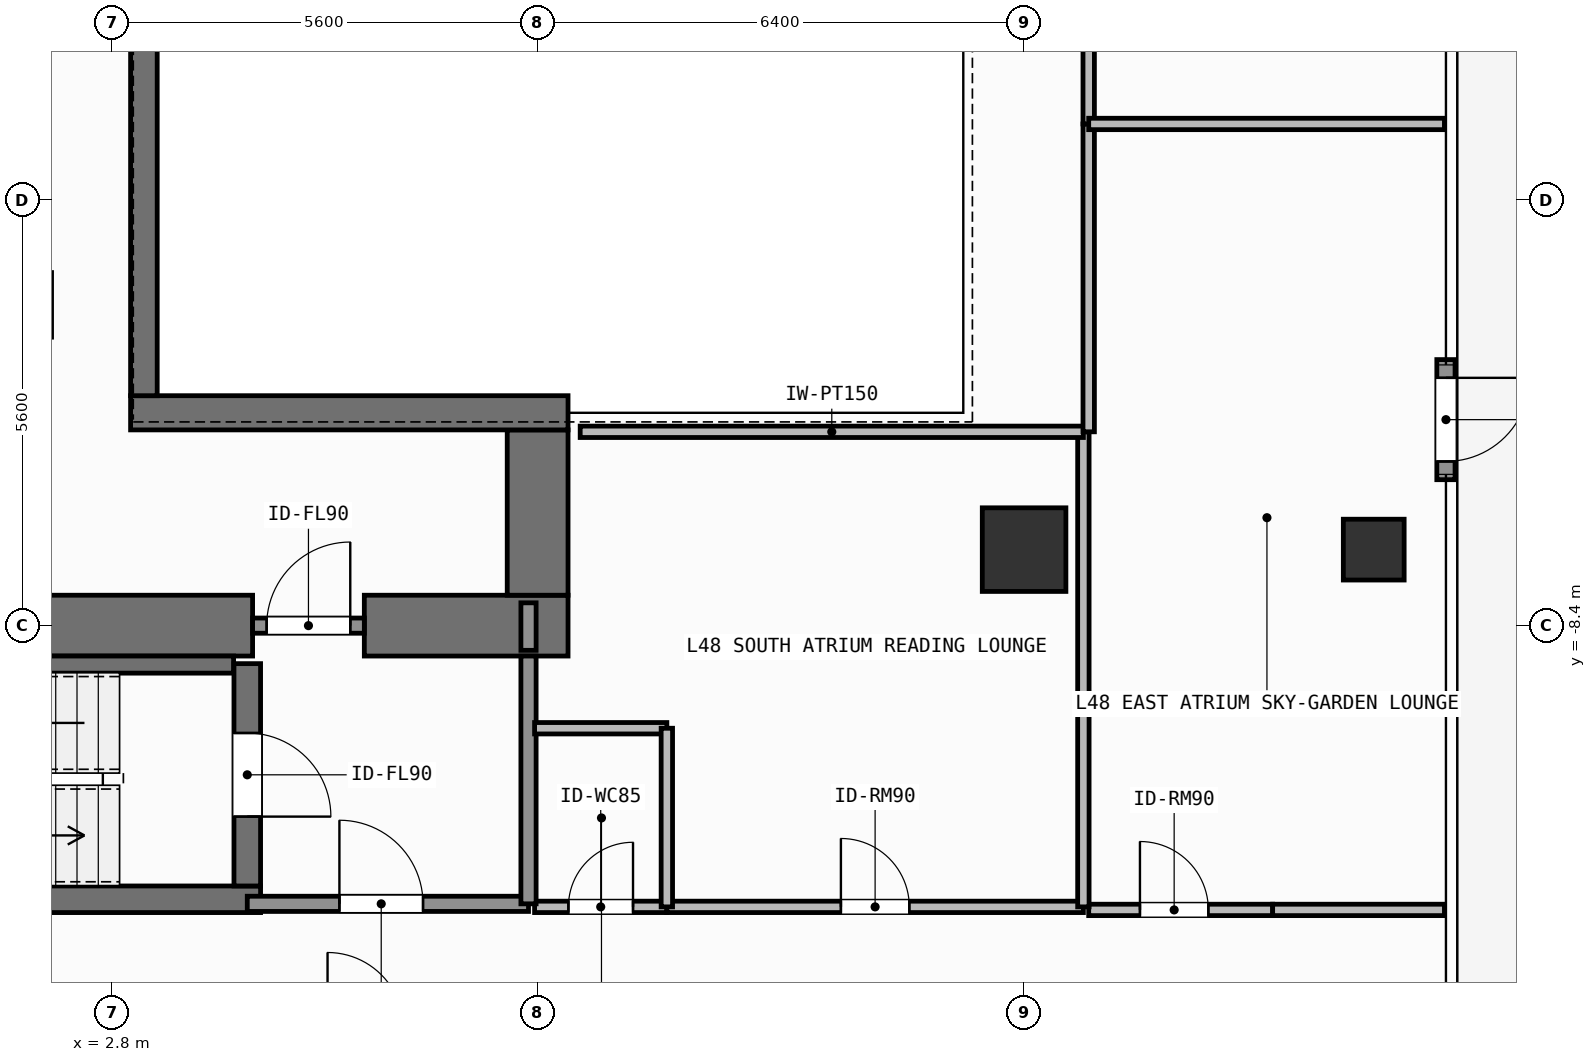
"""IFC4 building model, lengths in metres.
Left out: names, types, materials, properties, quantities, classifications, styles, units other than length and angle.
Written with IfcOpenShell. Run it as: python <this file> out.ifc"""

import sys

from ifc_helpers import new_model, si_unit, direction, frame, frame_2d, origin, origin_2d, place, context, subcontext, project, spatial, rectangle, hollow_rectangle, extrude, element, fill, save


model = new_model("IFC4")
c1 = context("Model", 3, precision=1e-05, world=origin(), true_north=direction((0.0, 1.0)))
c2 = subcontext(c1, "Body", "Model", "MODEL_VIEW")
j1 = project(units=[si_unit("LENGTHUNIT", "METRE"), si_unit("PLANEANGLEUNIT", "RADIAN")], contexts=[c1])
p1 = place(None, origin())
s1 = spatial("IfcSite", under=j1, at=p1, CompositionType="ELEMENT")
p2 = place(p1, origin())
s2 = spatial("IfcBuilding", under=s1, at=p2, CompositionType="ELEMENT")
p3 = place(p2, frame((0.0, 0.0, 195.3)))
s3 = spatial("IfcBuildingStorey", under=s2, at=p3, CompositionType="ELEMENT", Elevation=195.3)
p4 = place(p3, frame((-2.62, -8.4, 0.0), z_axis=(0.0, 0.0, 1.0), x_axis=(1.0, 0.0, 0.0)))
e1 = element("IfcWall", 1, at=p4, inside=s3, PredefinedType="SHEAR", context=c2, shape_type="SweptSolid", body=[
    extrude(rectangle(XDim=7.27, YDim=0.8, at=frame_2d((3.635, 0.0))), origin(), (0.0, 0.0, 1.0), 3.9),
])
p5 = place(p3, frame((6.12, -8.4, 0.0), z_axis=(0.0, 0.0, 1.0), x_axis=(1.0, 0.0, 0.0)))
e2 = element("IfcWall", 2, at=p5, inside=s3, PredefinedType="SHEAR", context=c2, shape_type="SweptSolid", body=[
    extrude(rectangle(XDim=2.68, YDim=0.8, at=frame_2d((1.34, 0.0))), origin(), (0.0, 0.0, 1.0), 3.9),
])
p6 = place(p3, frame((8.4, -8.0, 0.0), z_axis=(0.0, 0.0, 1.0), x_axis=(0.0, 1.0, 0.0)))
e3 = element("IfcWall", 3, at=p6, inside=s3, PredefinedType="SHEAR", context=c2, shape_type="SweptSolid", body=[
    extrude(rectangle(XDim=2.175, YDim=0.8, at=frame_2d((1.087, 0.0))), origin(), (0.0, 0.0, 1.0), 3.9),
])
p7 = place(p3, frame((3.045, -5.6, 0.0), z_axis=(0.0, 0.0, 1.0), x_axis=(1.0, 0.0, 0.0)))
e4 = element("IfcWall", 4, at=p7, inside=s3, PredefinedType="SHEAR", context=c2, shape_type="SweptSolid", body=[
    extrude(rectangle(XDim=5.755, YDim=0.45, at=frame_2d((2.877, 0.0))), origin(), (0.0, 0.0, 1.0), 3.9),
])
p8 = place(p3, frame((3.22, -5.375, 0.0), z_axis=(0.0, 0.0, 1.0), x_axis=(0.0, 1.0, 0.0)))
e5 = element("IfcWall", 5, at=p8, inside=s3, PredefinedType="SHEAR", context=c2, shape_type="SweptSolid", body=[
    extrude(rectangle(XDim=10.75, YDim=0.35, at=frame_2d((5.375, 0.0))), origin(), (0.0, 0.0, 1.0), 3.9),
])
p9 = place(p3, frame((-2.555, -12.0, 0.0), z_axis=(0.0, 0.0, 1.0), x_axis=(1.0, 0.0, 0.0)))
e6 = element("IfcWall", 6, at=p9, inside=s3, PredefinedType="SHEAR", context=c2, shape_type="SweptSolid", body=[
    extrude(rectangle(XDim=7.31, YDim=0.35, at=frame_2d((3.655, 0.0))), origin(), (0.0, 0.0, 1.0), 3.9),
])
p10 = place(p3, frame((-2.2, -8.913, 0.0), z_axis=(0.0, 0.0, 1.0), x_axis=(1.0, 0.0, 0.0)))
e7 = element("IfcWall", 7, at=p10, inside=s3, PredefinedType="SHEAR", context=c2, shape_type="SweptSolid", body=[
    extrude(rectangle(XDim=6.6, YDim=0.225, at=frame_2d((3.3, 0.0))), origin(), (0.0, 0.0, 1.0), 3.9),
])
p11 = place(p3, frame((4.58, -8.9, 0.0), z_axis=(0.0, 0.0, 1.0), x_axis=(0.0, -1.0, 0.0)))
e8 = element("IfcWall", 8, at=p11, inside=s3, PredefinedType="SHEAR", context=c2, shape_type="SweptSolid", body=[
    extrude(rectangle(XDim=2.925, YDim=0.35, at=frame_2d((1.462, 0.0))), origin(), (0.0, 0.0, 1.0), 3.9),
])
p12 = place(p11, frame((0.913, 0.0, 0.0)))
e9 = element("IfcOpeningElement", 9, at=p12, cuts=e8, PredefinedType="OPENING", context=c2, shape_type="SweptSolid", body=[
    extrude(rectangle(XDim=1.1, YDim=2.15, at=frame_2d((0.55, 1.075))), frame((0.0, 0.185, 0.0), z_axis=(0.0, -1.0, 0.0), x_axis=(1.0, 0.0, 0.0)), (0.0, 0.0, 1.0), 0.37),
])
p13 = place(p3, frame((14.8, -7.4, 0.0), z_axis=(0.0, 0.0, 1.0), x_axis=(1.0, 0.0, 0.0)))
e10 = element("IfcColumn", 10, at=p13, inside=s3, PredefinedType="COLUMN", context=c2, shape_type="SweptSolid", body=[
    extrude(rectangle(XDim=1.1, YDim=1.1, at=origin_2d()), origin(), (0.0, 0.0, 1.0), 3.9),
])
p14 = place(p3, frame((19.4, -7.4, 0.0), z_axis=(0.0, 0.0, 1.0), x_axis=(1.0, 0.0, 0.0)))
e11 = element("IfcColumn", 11, at=p14, inside=s3, PredefinedType="COLUMN", context=c2, shape_type="SweptSolid", body=[
    extrude(hollow_rectangle(XDim=0.8, YDim=0.8, WallThickness=0.036, at=origin_2d()), origin(), (0.0, 0.0, 1.0), 3.9),
])
p15 = place(p3, frame((20.35, -4.9, 0.0), z_axis=(0.0, 0.0, 1.0), x_axis=(0.0, -1.0, 0.0)))
e12 = element("IfcWall", 12, at=p15, inside=s3, PredefinedType="SOLIDWALL", context=c2, shape_type="SweptSolid", body=[
    extrude(rectangle(XDim=1.58, YDim=0.24, at=frame_2d((0.79, 0.0))), origin(), (0.0, 0.0, 1.0), 3.68),
])
p16 = place(p15, frame((0.24, 0.0, 0.0)))
e13 = element("IfcOpeningElement", 13, at=p16, cuts=e12, PredefinedType="OPENING", context=c2, shape_type="SweptSolid", body=[
    extrude(rectangle(XDim=1.1, YDim=2.2, at=frame_2d((0.55, 1.1))), frame((0.0, 0.13, 0.0), z_axis=(0.0, -1.0, 0.0), x_axis=(1.0, 0.0, 0.0)), (0.0, 0.0, 1.0), 0.26),
])
p17 = place(p3, frame((4.58, -12.06, 0.0), z_axis=(0.0, 0.0, 1.0), x_axis=(1.0, 0.0, 0.0)))
e14 = element("IfcWall", 14, at=p17, inside=s3, PredefinedType="SOLIDWALL", context=c2, shape_type="SweptSolid", body=[
    extrude(rectangle(XDim=3.7, YDim=0.2, at=frame_2d((1.85, 0.0))), origin(), (0.0, 0.0, 1.0), 3.68),
])
p18 = place(p17, frame((1.212, 0.0, 0.0)))
e15 = element("IfcOpeningElement", 15, at=p18, cuts=e14, PredefinedType="OPENING", context=c2, shape_type="SweptSolid", body=[
    extrude(rectangle(XDim=1.1, YDim=2.15, at=frame_2d((0.55, 1.075))), frame((0.0, 0.11, 0.0), z_axis=(0.0, -1.0, 0.0), x_axis=(1.0, 0.0, 0.0)), (0.0, 0.0, 1.0), 0.22),
])
p19 = place(p3, frame((4.65, -8.4, 0.0), z_axis=(0.0, 0.0, 1.0), x_axis=(1.0, 0.0, 0.0)))
e16 = element("IfcWall", 16, at=p19, inside=s3, PredefinedType="SOLIDWALL", context=c2, shape_type="SweptSolid", body=[
    extrude(rectangle(XDim=1.47, YDim=0.2, at=frame_2d((0.735, 0.0))), origin(), (0.0, 0.0, 1.0), 2.82),
])
p20 = place(p19, frame((0.185, 0.0, 0.0)))
e17 = element("IfcOpeningElement", 17, at=p20, cuts=e16, PredefinedType="OPENING", context=c2, shape_type="SweptSolid", body=[
    extrude(rectangle(XDim=1.1, YDim=2.15, at=frame_2d((0.55, 1.075))), frame((0.0, 0.11, 0.0), z_axis=(0.0, -1.0, 0.0), x_axis=(1.0, 0.0, 0.0)), (0.0, 0.0, 1.0), 0.22),
])
p21 = place(p3, frame((8.36, -12.1, 0.0), z_axis=(0.0, 0.0, 1.0), x_axis=(1.0, 0.0, 0.0)))
e18 = element("IfcWall", 18, at=p21, inside=s3, PredefinedType="PARTITIONING", context=c2, shape_type="SweptSolid", body=[
    extrude(rectangle(XDim=1.74, YDim=0.15, at=frame_2d((0.87, 0.0))), origin(), (0.0, 0.0, 1.0), 3.68),
])
p22 = place(p21, frame((0.445, 0.0, 0.0)))
e19 = element("IfcOpeningElement", 19, at=p22, cuts=e18, PredefinedType="OPENING", context=c2, shape_type="SweptSolid", body=[
    extrude(rectangle(XDim=0.85, YDim=2.1, at=frame_2d((0.425, 1.05))), frame((0.0, 0.085, 0.0), z_axis=(0.0, -1.0, 0.0), x_axis=(1.0, 0.0, 0.0)), (0.0, 0.0, 1.0), 0.17),
])
p23 = place(p3, frame((10.1, -12.1, 0.0), z_axis=(0.0, 0.0, 1.0), x_axis=(1.0, 0.0, 0.0)))
e20 = element("IfcWall", 20, at=p23, inside=s3, PredefinedType="PARTITIONING", context=c2, shape_type="SweptSolid", body=[
    extrude(rectangle(XDim=5.48, YDim=0.15, at=frame_2d((2.74, 0.0))), origin(), (0.0, 0.0, 1.0), 3.68),
])
p24 = place(p23, frame((2.29, 0.0, 0.0)))
e21 = element("IfcOpeningElement", 21, at=p24, cuts=e20, PredefinedType="OPENING", context=c2, shape_type="SweptSolid", body=[
    extrude(rectangle(XDim=0.9, YDim=2.1, at=frame_2d((0.45, 1.05))), frame((0.0, 0.085, 0.0), z_axis=(0.0, -1.0, 0.0), x_axis=(1.0, 0.0, 0.0)), (0.0, 0.0, 1.0), 0.17),
])
p25 = place(p3, frame((15.65, -12.14, 0.0), z_axis=(0.0, 0.0, 1.0), x_axis=(1.0, 0.0, 0.0)))
e22 = element("IfcWall", 22, at=p25, inside=s3, PredefinedType="PARTITIONING", context=c2, shape_type="SweptSolid", body=[
    extrude(rectangle(XDim=2.42, YDim=0.15, at=frame_2d((1.21, 0.0))), origin(), (0.0, 0.0, 1.0), 3.68),
])
p26 = place(p25, frame((0.674, 0.0, 0.0)))
e23 = element("IfcOpeningElement", 23, at=p26, cuts=e22, PredefinedType="OPENING", context=c2, shape_type="SweptSolid", body=[
    extrude(rectangle(XDim=0.9, YDim=2.1, at=frame_2d((0.45, 1.05))), frame((0.0, 0.085, 0.0), z_axis=(0.0, -1.0, 0.0), x_axis=(1.0, 0.0, 0.0)), (0.0, 0.0, 1.0), 0.17),
])
p27 = place(p3, frame((8.28, -12.06, 0.0), z_axis=(0.0, 0.0, 1.0), x_axis=(0.0, 1.0, 0.0)))
e24 = element("IfcWall", 24, at=p27, inside=s3, PredefinedType="SOLIDWALL", context=c2, shape_type="SweptSolid", body=[
    extrude(rectangle(XDim=3.26, YDim=0.2, at=frame_2d((1.63, 0.0))), origin(), (0.0, 0.0, 1.0), 3.68),
])
p28 = place(p3, frame((8.28, -8.725, 0.0), z_axis=(0.0, 0.0, 1.0), x_axis=(0.0, 1.0, 0.0)))
e25 = element("IfcWall", 25, at=p28, inside=s3, PredefinedType="SOLIDWALL", context=c2, shape_type="SweptSolid", body=[
    extrude(rectangle(XDim=0.625, YDim=0.2, at=frame_2d((0.312, 0.0))), origin(), (0.0, 0.0, 1.0), 3.68),
])
p29 = place(p3, frame((8.36, -9.75, 0.0), z_axis=(0.0, 0.0, 1.0), x_axis=(1.0, 0.0, 0.0)))
e26 = element("IfcWall", 26, at=p29, inside=s3, PredefinedType="PARTITIONING", context=c2, shape_type="SweptSolid", body=[
    extrude(rectangle(XDim=1.74, YDim=0.15, at=frame_2d((0.87, 0.0))), origin(), (0.0, 0.0, 1.0), 3.68),
])
p30 = place(p3, frame((10.1, -12.1, 0.0), z_axis=(0.0, 0.0, 1.0), x_axis=(0.0, 1.0, 0.0)))
e27 = element("IfcWall", 27, at=p30, inside=s3, PredefinedType="PARTITIONING", context=c2, shape_type="SweptSolid", body=[
    extrude(rectangle(XDim=2.35, YDim=0.15, at=frame_2d((1.175, 0.0))), origin(), (0.0, 0.0, 1.0), 3.68),
])
p31 = place(p3, frame((15.58, -12.1, 0.0), z_axis=(0.0, 0.0, 1.0), x_axis=(0.0, 1.0, 0.0)))
e28 = element("IfcWall", 28, at=p31, inside=s3, PredefinedType="PARTITIONING", context=c2, shape_type="SweptSolid", body=[
    extrude(rectangle(XDim=6.25, YDim=0.15, at=frame_2d((3.125, 0.0))), origin(), (0.0, 0.0, 1.0), 3.68),
])
p32 = place(p3, frame((8.96, -5.85, 0.0), z_axis=(0.0, 0.0, 1.0), x_axis=(1.0, 0.0, 0.0)))
e29 = element("IfcWall", 29, at=p32, inside=s3, PredefinedType="PARTITIONING", context=c2, shape_type="SweptSolid", body=[
    extrude(rectangle(XDim=6.62, YDim=0.15, at=frame_2d((3.31, 0.0))), origin(), (0.0, 0.0, 1.0), 3.68),
])
p33 = place(p3, frame((15.65, -5.85, 0.0), z_axis=(0.0, 0.0, 1.0), x_axis=(0.0, 1.0, 0.0)))
e30 = element("IfcWall", 30, at=p33, inside=s3, PredefinedType="PARTITIONING", context=c2, shape_type="SweptSolid", body=[
    extrude(rectangle(XDim=4.05, YDim=0.15, at=frame_2d((2.025, 0.0))), origin(), (0.0, 0.0, 1.0), 3.68),
])
p34 = place(p3, frame((15.65, -1.8, 0.0), z_axis=(0.0, 0.0, 1.0), x_axis=(0.0, 1.0, 0.0)))
e31 = element("IfcWall", 31, at=p34, inside=s3, PredefinedType="PARTITIONING", context=c2, shape_type="SweptSolid", body=[
    extrude(rectangle(XDim=7.65, YDim=0.15, at=frame_2d((3.825, 0.0))), origin(), (0.0, 0.0, 1.0), 3.68),
])
p35 = place(p3, frame((15.65, -1.8, 0.0), z_axis=(0.0, 0.0, 1.0), x_axis=(1.0, 0.0, 0.0)))
e32 = element("IfcWall", 32, at=p35, inside=s3, PredefinedType="PARTITIONING", context=c2, shape_type="SweptSolid", body=[
    extrude(rectangle(XDim=4.68, YDim=0.15, at=frame_2d((2.34, 0.0))), origin(), (0.0, 0.0, 1.0), 3.68),
])
p36 = place(p3, frame((18.07, -12.14, 0.0), z_axis=(0.0, 0.0, 1.0), x_axis=(1.0, 0.0, 0.0)))
e33 = element("IfcWall", 33, at=p36, inside=s3, PredefinedType="PARTITIONING", context=c2, shape_type="SweptSolid", body=[
    extrude(rectangle(XDim=2.26, YDim=0.15, at=frame_2d((1.13, 0.0))), origin(), (0.0, 0.0, 1.0), 3.68),
])
p37 = place(p16, origin())
e34 = element("IfcDoor", 34, at=p37, inside=s3, OperationType="SINGLE_SWING_LEFT", PredefinedType="DOOR", context=c2, shape_type="SweptSolid", body=[
    extrude(rectangle(XDim=1.1, YDim=2.2, at=frame_2d((0.55, 1.1))), frame((0.0, 0.025, 0.0), z_axis=(0.0, -1.0, 0.0), x_axis=(1.0, 0.0, 0.0)), (0.0, 0.0, 1.0), 0.05),
])
fill(e13, e34)
p38 = place(p12, origin())
e35 = element("IfcDoor", 35, at=p38, inside=s3, OperationType="SINGLE_SWING_RIGHT", PredefinedType="DOOR", context=c2, shape_type="SweptSolid", body=[
    extrude(rectangle(XDim=1.1, YDim=2.15, at=frame_2d((0.55, 1.075))), frame((0.0, 0.025, 0.0), z_axis=(0.0, -1.0, 0.0), x_axis=(1.0, 0.0, 0.0)), (0.0, 0.0, 1.0), 0.05),
])
fill(e9, e35)
p39 = place(p18, origin())
e36 = element("IfcDoor", 36, at=p39, inside=s3, OperationType="SINGLE_SWING_LEFT", PredefinedType="DOOR", context=c2, shape_type="SweptSolid", body=[
    extrude(rectangle(XDim=1.1, YDim=2.15, at=frame_2d((0.55, 1.075))), frame((0.0, 0.025, 0.0), z_axis=(0.0, -1.0, 0.0), x_axis=(1.0, 0.0, 0.0)), (0.0, 0.0, 1.0), 0.05),
])
fill(e15, e36)
p40 = place(p20, origin())
e37 = element("IfcDoor", 37, at=p40, inside=s3, OperationType="SINGLE_SWING_RIGHT", PredefinedType="DOOR", context=c2, shape_type="SweptSolid", body=[
    extrude(rectangle(XDim=1.1, YDim=2.15, at=frame_2d((0.55, 1.075))), frame((0.0, 0.025, 0.0), z_axis=(0.0, -1.0, 0.0), x_axis=(1.0, 0.0, 0.0)), (0.0, 0.0, 1.0), 0.05),
])
fill(e17, e37)
p41 = place(p22, origin())
e38 = element("IfcDoor", 38, at=p41, inside=s3, OperationType="SINGLE_SWING_RIGHT", PredefinedType="DOOR", context=c2, shape_type="SweptSolid", body=[
    extrude(rectangle(XDim=0.85, YDim=2.1, at=frame_2d((0.425, 1.05))), frame((0.0, 0.025, 0.0), z_axis=(0.0, -1.0, 0.0), x_axis=(1.0, 0.0, 0.0)), (0.0, 0.0, 1.0), 0.05),
])
fill(e19, e38)
p42 = place(p24, origin())
e39 = element("IfcDoor", 39, at=p42, inside=s3, OperationType="SINGLE_SWING_LEFT", PredefinedType="DOOR", context=c2, shape_type="SweptSolid", body=[
    extrude(rectangle(XDim=0.9, YDim=2.1, at=frame_2d((0.45, 1.05))), frame((0.0, 0.025, 0.0), z_axis=(0.0, -1.0, 0.0), x_axis=(1.0, 0.0, 0.0)), (0.0, 0.0, 1.0), 0.05),
])
fill(e21, e39)
p43 = place(p26, origin())
e40 = element("IfcDoor", 40, at=p43, inside=s3, OperationType="SINGLE_SWING_LEFT", PredefinedType="DOOR", context=c2, shape_type="SweptSolid", body=[
    extrude(rectangle(XDim=0.9, YDim=2.1, at=frame_2d((0.45, 1.05))), frame((0.0, 0.025, 0.0), z_axis=(0.0, -1.0, 0.0), x_axis=(1.0, 0.0, 0.0)), (0.0, 0.0, 1.0), 0.05),
])
fill(e23, e40)
save(model, sys.argv[1])
